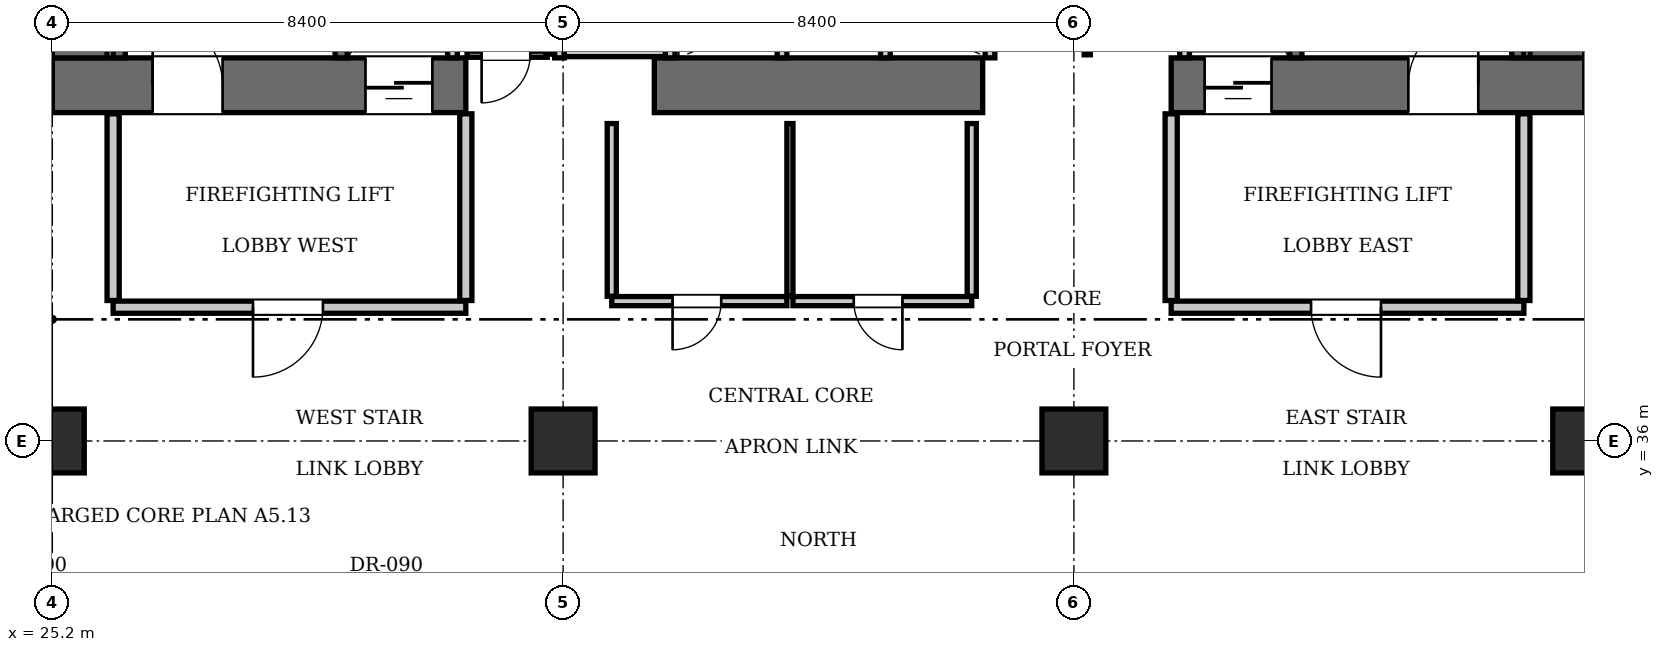
"""IFC4 building model, lengths in metres.
Left out: names, types, materials, properties, quantities, classifications, styles, units other than length and angle.
Written with IfcOpenShell. Run it as: python <this file> out.ifc"""

import sys

from ifc_helpers import new_model, si_unit, direction, frame, frame_2d, origin, origin_2d, place, context, subcontext, project, spatial, rectangle, extrude, element, fill, save


model = new_model("IFC4")
c1 = context("Model", 3, precision=1e-05, world=origin(), true_north=direction((0.0, 1.0)))
c2 = subcontext(c1, "Body", "Model", "MODEL_VIEW")
j1 = project(units=[si_unit("LENGTHUNIT", "METRE"), si_unit("PLANEANGLEUNIT", "RADIAN")], contexts=[c1])
p1 = place(None, origin())
s1 = spatial("IfcSite", under=j1, at=p1, CompositionType="ELEMENT")
p2 = place(p1, origin())
s2 = spatial("IfcBuilding", under=s1, at=p2, CompositionType="ELEMENT")
p3 = place(p2, frame((0.0, 0.0, 73.15)))
s3 = spatial("IfcBuildingStorey", under=s2, at=p3, CompositionType="ELEMENT", Elevation=73.15)
p4 = place(p3, frame((25.2, 41.85, 0.0), z_axis=(0.0, 0.0, 1.0), x_axis=(1.0, 0.0, 0.0)))
e1 = element("IfcWall", 1, at=p4, inside=s3, PredefinedType="SHEAR", context=c2, shape_type="SweptSolid", body=[
    extrude(rectangle(XDim=6.8, YDim=0.9, at=frame_2d((3.4, 0.0))), origin(), (0.0, 0.0, 1.0), 3.85),
])
p5 = place(p4, frame((1.65, 0.0, 0.0)))
e2 = element("IfcOpeningElement", 2, at=p5, cuts=e1, PredefinedType="OPENING", context=c2, shape_type="SweptSolid", body=[
    extrude(rectangle(XDim=1.15, YDim=2.15, at=frame_2d((0.575, 1.075))), frame((0.0, 0.46, 0.0), z_axis=(0.0, -1.0, 0.0), x_axis=(1.0, 0.0, 0.0)), (0.0, 0.0, 1.0), 0.92),
])
p6 = place(p4, frame((5.15, 0.0, 0.0)))
e3 = element("IfcOpeningElement", 3, at=p6, cuts=e1, PredefinedType="OPENING", context=c2, shape_type="SweptSolid", body=[
    extrude(rectangle(XDim=1.1, YDim=2.2, at=frame_2d((0.55, 1.1))), frame((0.0, 0.46, 0.0), z_axis=(0.0, -1.0, 0.0), x_axis=(1.0, 0.0, 0.0)), (0.0, 0.0, 1.0), 0.92),
])
p7 = place(p3, frame((35.1, 41.85, 0.0), z_axis=(0.0, 0.0, 1.0), x_axis=(1.0, 0.0, 0.0)))
e4 = element("IfcWall", 4, at=p7, inside=s3, PredefinedType="SHEAR", context=c2, shape_type="SweptSolid", body=[
    extrude(rectangle(XDim=5.4, YDim=0.9, at=frame_2d((2.7, 0.0))), origin(), (0.0, 0.0, 1.0), 3.85),
])
p8 = place(p3, frame((43.6, 41.85, 0.0), z_axis=(0.0, 0.0, 1.0), x_axis=(1.0, 0.0, 0.0)))
e5 = element("IfcWall", 5, at=p8, inside=s3, PredefinedType="SHEAR", context=c2, shape_type="SweptSolid", body=[
    extrude(rectangle(XDim=6.8, YDim=0.9, at=frame_2d((3.4, 0.0))), origin(), (0.0, 0.0, 1.0), 3.85),
])
p9 = place(p8, frame((3.9, 0.0, 0.0)))
e6 = element("IfcOpeningElement", 6, at=p9, cuts=e5, PredefinedType="OPENING", context=c2, shape_type="SweptSolid", body=[
    extrude(rectangle(XDim=1.15, YDim=2.15, at=frame_2d((0.575, 1.075))), frame((0.0, 0.46, 0.0), z_axis=(0.0, -1.0, 0.0), x_axis=(1.0, 0.0, 0.0)), (0.0, 0.0, 1.0), 0.92),
])
p10 = place(p8, frame((0.55, 0.0, 0.0)))
e7 = element("IfcOpeningElement", 7, at=p10, cuts=e5, PredefinedType="OPENING", context=c2, shape_type="SweptSolid", body=[
    extrude(rectangle(XDim=1.1, YDim=2.2, at=frame_2d((0.55, 1.1))), frame((0.0, 0.46, 0.0), z_axis=(0.0, -1.0, 0.0), x_axis=(1.0, 0.0, 0.0)), (0.0, 0.0, 1.0), 0.92),
])
for number, where, z_axis, x_axis in (
    (8, (25.65, 42.3, 0.0), (0.0, 0.0, 1.0), (0.0, 1.0, 0.0)),
    (9, (49.95, 42.3, 0.0), (0.0, 0.0, 1.0), (0.0, 1.0, 0.0)),
):
    element("IfcWall", number, at=place(p3, frame(where, z_axis=z_axis, x_axis=x_axis)), inside=s3, PredefinedType="SHEAR", context=c2, shape_type="SweptSolid", body=[
        extrude(rectangle(XDim=1.6, YDim=0.9, at=frame_2d((0.8, 0.0))), origin(), (0.0, 0.0, 1.0), 3.85),
    ])
for number, where, z_axis, x_axis in (
    (10, (25.2, 36.0, 0.0), (0.0, 0.0, 1.0), (1.0, 0.0, 0.0)),
    (11, (33.6, 36.0, 0.0), (0.0, 0.0, 1.0), (1.0, 0.0, 0.0)),
    (12, (42.0, 36.0, 0.0), (0.0, 0.0, 1.0), (1.0, 0.0, 0.0)),
    (13, (50.4, 36.0, 0.0), (0.0, 0.0, 1.0), (1.0, 0.0, 0.0)),
):
    element("IfcColumn", number, at=place(p3, frame(where, z_axis=z_axis, x_axis=x_axis)), inside=s3, PredefinedType="COLUMN", context=c2, shape_type="SweptSolid", body=[
        extrude(rectangle(XDim=1.05, YDim=1.05, at=origin_2d()), origin(), (0.0, 0.0, 1.0), 3.85),
    ])
p11 = place(p3, frame((29.95, 42.3, 0.0), z_axis=(0.0, 0.0, 1.0), x_axis=(0.0, 1.0, 0.0)))
e14 = element("IfcWall", 14, at=p11, inside=s3, PredefinedType="SOLIDWALL", context=c2, shape_type="SweptSolid", body=[
    extrude(rectangle(XDim=8.85, YDim=0.2, at=frame_2d((4.425, 0.0))), origin(), (0.0, 0.0, 1.0), 3.61),
])
p12 = place(p3, frame((26.3, 42.3, 0.0), z_axis=(0.0, 0.0, 1.0), x_axis=(0.0, 1.0, 0.0)))
e15 = element("IfcWall", 15, at=p12, inside=s3, PredefinedType="SOLIDWALL", context=c2, shape_type="SweptSolid", body=[
    extrude(rectangle(XDim=1.58, YDim=0.2, at=frame_2d((0.79, 0.0))), origin(), (0.0, 0.0, 1.0), 3.61),
])
p13 = place(p3, frame((45.65, 42.3, 0.0), z_axis=(0.0, 0.0, 1.0), x_axis=(0.0, 1.0, 0.0)))
e16 = element("IfcWall", 16, at=p13, inside=s3, PredefinedType="SOLIDWALL", context=c2, shape_type="SweptSolid", body=[
    extrude(rectangle(XDim=8.85, YDim=0.2, at=frame_2d((4.425, 0.0))), origin(), (0.0, 0.0, 1.0), 3.61),
])
p14 = place(p3, frame((49.3, 42.3, 0.0), z_axis=(0.0, 0.0, 1.0), x_axis=(0.0, 1.0, 0.0)))
e17 = element("IfcWall", 17, at=p14, inside=s3, PredefinedType="SOLIDWALL", context=c2, shape_type="SweptSolid", body=[
    extrude(rectangle(XDim=1.58, YDim=0.2, at=frame_2d((0.79, 0.0))), origin(), (0.0, 0.0, 1.0), 3.61),
])
for number, where, z_axis, x_axis in (
    (18, (31.78, 42.3, 0.0), (0.0, 0.0, 1.0), (0.0, 1.0, 0.0)),
    (19, (43.82, 42.3, 0.0), (0.0, 0.0, 1.0), (0.0, 1.0, 0.0)),
):
    element("IfcWall", number, at=place(p3, frame(where, z_axis=z_axis, x_axis=x_axis)), inside=s3, PredefinedType="SOLIDWALL", context=c2, shape_type="SweptSolid", body=[
        extrude(rectangle(XDim=2.44, YDim=0.16, at=frame_2d((1.22, 0.0))), origin(), (0.0, 0.0, 1.0), 3.61),
    ])
for number, where, z_axis, x_axis in (
    (20, (37.2, 42.3, 0.0), (0.0, 0.0, 1.0), (0.0, 1.0, 0.0)),
    (21, (38.9, 42.3, 0.0), (0.0, 0.0, 1.0), (0.0, 1.0, 0.0)),
    (22, (40.62, 42.3, 0.0), (0.0, 0.0, 1.0), (0.0, 1.0, 0.0)),
):
    element("IfcWall", number, at=place(p3, frame(where, z_axis=z_axis, x_axis=x_axis)), inside=s3, PredefinedType="SOLIDWALL", context=c2, shape_type="SweptSolid", body=[
        extrude(rectangle(XDim=2.05, YDim=0.16, at=frame_2d((1.025, 0.0))), origin(), (0.0, 0.0, 1.0), 3.61),
    ])
for number, where, z_axis, x_axis in (
    (23, (33.54, 42.3, 0.0), (0.0, 0.0, 1.0), (0.0, 1.0, 0.0)),
    (24, (35.36, 42.3, 0.0), (0.0, 0.0, 1.0), (0.0, 1.0, 0.0)),
):
    element("IfcWall", number, at=place(p3, frame(where, z_axis=z_axis, x_axis=x_axis)), inside=s3, PredefinedType="SOLIDWALL", context=c2, shape_type="SweptSolid", body=[
        extrude(rectangle(XDim=2.1, YDim=0.16, at=frame_2d((1.05, 0.0))), origin(), (0.0, 0.0, 1.0), 3.61),
    ])
p15 = place(p3, frame((33.62, 42.4, 0.0), z_axis=(0.0, 0.0, 1.0), x_axis=(1.0, 0.0, 0.0)))
e25 = element("IfcWall", 25, at=p15, inside=s3, PredefinedType="SOLIDWALL", context=c2, shape_type="SweptSolid", body=[
    extrude(rectangle(XDim=1.66, YDim=0.16, at=frame_2d((0.83, 0.0))), origin(), (0.0, 0.0, 1.0), 3.61),
])
p16 = place(p3, frame((26.2, 38.2, 0.0), z_axis=(0.0, 0.0, 1.0), x_axis=(1.0, 0.0, 0.0)))
e26 = element("IfcWall", 26, at=p16, inside=s3, PredefinedType="PARTITIONING", context=c2, shape_type="SweptSolid", body=[
    extrude(rectangle(XDim=5.8, YDim=0.2, at=frame_2d((2.9, 0.0))), origin(), (0.0, 0.0, 1.0), 3.61),
])
p17 = place(p16, frame((2.3, 0.0, 0.0)))
e27 = element("IfcOpeningElement", 27, at=p17, cuts=e26, PredefinedType="OPENING", context=c2, shape_type="SweptSolid", body=[
    extrude(rectangle(XDim=1.15, YDim=2.15, at=frame_2d((0.575, 1.075))), frame((0.0, 0.11, 0.0), z_axis=(0.0, -1.0, 0.0), x_axis=(1.0, 0.0, 0.0)), (0.0, 0.0, 1.0), 0.22),
])
for number, where, z_axis, x_axis in (
    (28, (26.2, 38.31, 0.0), (0.0, 0.0, 1.0), (0.0, 1.0, 0.0)),
    (29, (32.0, 38.31, 0.0), (0.0, 0.0, 1.0), (0.0, 1.0, 0.0)),
):
    element("IfcWall", number, at=place(p3, frame(where, z_axis=z_axis, x_axis=x_axis)), inside=s3, PredefinedType="PARTITIONING", context=c2, shape_type="SweptSolid", body=[
        extrude(rectangle(XDim=3.07, YDim=0.2, at=frame_2d((1.535, 0.0))), origin(), (0.0, 0.0, 1.0), 3.61),
    ])
p18 = place(p3, frame((43.6, 38.2, 0.0), z_axis=(0.0, 0.0, 1.0), x_axis=(1.0, 0.0, 0.0)))
e30 = element("IfcWall", 30, at=p18, inside=s3, PredefinedType="PARTITIONING", context=c2, shape_type="SweptSolid", body=[
    extrude(rectangle(XDim=5.8, YDim=0.2, at=frame_2d((2.9, 0.0))), origin(), (0.0, 0.0, 1.0), 3.61),
])
p19 = place(p18, frame((2.3, 0.0, 0.0)))
e31 = element("IfcOpeningElement", 31, at=p19, cuts=e30, PredefinedType="OPENING", context=c2, shape_type="SweptSolid", body=[
    extrude(rectangle(XDim=1.15, YDim=2.15, at=frame_2d((0.575, 1.075))), frame((0.0, 0.11, 0.0), z_axis=(0.0, -1.0, 0.0), x_axis=(1.0, 0.0, 0.0)), (0.0, 0.0, 1.0), 0.22),
])
for number, where, z_axis, x_axis in (
    (32, (43.6, 38.31, 0.0), (0.0, 0.0, 1.0), (0.0, 1.0, 0.0)),
    (33, (49.4, 38.31, 0.0), (0.0, 0.0, 1.0), (0.0, 1.0, 0.0)),
):
    element("IfcWall", number, at=place(p3, frame(where, z_axis=z_axis, x_axis=x_axis)), inside=s3, PredefinedType="PARTITIONING", context=c2, shape_type="SweptSolid", body=[
        extrude(rectangle(XDim=3.07, YDim=0.2, at=frame_2d((1.535, 0.0))), origin(), (0.0, 0.0, 1.0), 3.61),
    ])
p20 = place(p3, frame((32.02, 42.36, 0.0), z_axis=(0.0, 0.0, 1.0), x_axis=(1.0, 0.0, 0.0)))
e34 = element("IfcWall", 34, at=p20, inside=s3, PredefinedType="PARTITIONING", context=c2, shape_type="SweptSolid", body=[
    extrude(rectangle(XDim=1.32, YDim=0.1, at=frame_2d((0.66, 0.0))), origin(), (0.0, 0.0, 1.0), 3.61),
])
p21 = place(p20, frame((0.24, 0.0, 0.0)))
e35 = element("IfcOpeningElement", 35, at=p21, cuts=e34, PredefinedType="OPENING", context=c2, shape_type="SweptSolid", body=[
    extrude(rectangle(XDim=0.8, YDim=2.05, at=frame_2d((0.4, 1.025))), frame((0.0, 0.06, 0.0), z_axis=(0.0, -1.0, 0.0), x_axis=(1.0, 0.0, 0.0)), (0.0, 0.0, 1.0), 0.12),
])
p22 = place(p3, frame((33.36, 42.36, 0.0), z_axis=(0.0, 0.0, 1.0), x_axis=(0.0, 1.0, 0.0)))
e36 = element("IfcWall", 36, at=p22, inside=s3, PredefinedType="PARTITIONING", context=c2, shape_type="SweptSolid", body=[
    extrude(rectangle(XDim=2.58, YDim=0.1, at=frame_2d((1.29, 0.0))), origin(), (0.0, 0.0, 1.0), 3.61),
])
p23 = place(p3, frame((42.22, 42.35, 0.0), z_axis=(0.0, 0.0, 1.0), x_axis=(0.0, 1.0, 0.0)))
e37 = element("IfcWall", 37, at=p23, inside=s3, PredefinedType="PARTITIONING", context=c2, shape_type="SweptSolid", body=[
    extrude(rectangle(XDim=2.61, YDim=0.1, at=frame_2d((1.305, 0.0))), origin(), (0.0, 0.0, 1.0), 3.61),
])
p24 = place(p23, frame((0.65, 0.0, 0.0)))
e38 = element("IfcOpeningElement", 38, at=p24, cuts=e37, PredefinedType="OPENING", context=c2, shape_type="SweptSolid", body=[
    extrude(rectangle(XDim=0.8, YDim=2.05, at=frame_2d((0.4, 1.025))), frame((0.0, 0.06, 0.0), z_axis=(0.0, -1.0, 0.0), x_axis=(1.0, 0.0, 0.0)), (0.0, 0.0, 1.0), 0.12),
])
p25 = place(p3, frame((34.4, 38.3, 0.0), z_axis=(0.0, 0.0, 1.0), x_axis=(1.0, 0.0, 0.0)))
e39 = element("IfcWall", 39, at=p25, inside=s3, PredefinedType="PARTITIONING", context=c2, shape_type="SweptSolid", body=[
    extrude(rectangle(XDim=2.88, YDim=0.15, at=frame_2d((1.44, 0.0))), origin(), (0.0, 0.0, 1.0), 3.61),
])
p26 = place(p25, frame((1.0, 0.0, 0.0)))
e40 = element("IfcOpeningElement", 40, at=p26, cuts=e39, PredefinedType="OPENING", context=c2, shape_type="SweptSolid", body=[
    extrude(rectangle(XDim=0.8, YDim=2.05, at=frame_2d((0.4, 1.025))), frame((0.0, 0.085, 0.0), z_axis=(0.0, -1.0, 0.0), x_axis=(1.0, 0.0, 0.0)), (0.0, 0.0, 1.0), 0.17),
])
p27 = place(p3, frame((37.38, 38.3, 0.0), z_axis=(0.0, 0.0, 1.0), x_axis=(1.0, 0.0, 0.0)))
e41 = element("IfcWall", 41, at=p27, inside=s3, PredefinedType="PARTITIONING", context=c2, shape_type="SweptSolid", body=[
    extrude(rectangle(XDim=2.94, YDim=0.15, at=frame_2d((1.47, 0.0))), origin(), (0.0, 0.0, 1.0), 3.61),
])
p28 = place(p27, frame((1.0, 0.0, 0.0)))
e42 = element("IfcOpeningElement", 42, at=p28, cuts=e41, PredefinedType="OPENING", context=c2, shape_type="SweptSolid", body=[
    extrude(rectangle(XDim=0.8, YDim=2.05, at=frame_2d((0.4, 1.025))), frame((0.0, 0.085, 0.0), z_axis=(0.0, -1.0, 0.0), x_axis=(1.0, 0.0, 0.0)), (0.0, 0.0, 1.0), 0.17),
])
p29 = place(p3, frame((34.4, 38.38, 0.0), z_axis=(0.0, 0.0, 1.0), x_axis=(0.0, 1.0, 0.0)))
e43 = element("IfcWall", 43, at=p29, inside=s3, PredefinedType="PARTITIONING", context=c2, shape_type="SweptSolid", body=[
    extrude(rectangle(XDim=2.84, YDim=0.15, at=frame_2d((1.42, 0.0))), origin(), (0.0, 0.0, 1.0), 3.61),
])
p30 = place(p3, frame((37.33, 38.38, 0.0), z_axis=(0.0, 0.0, 1.0), x_axis=(0.0, 1.0, 0.0)))
e44 = element("IfcWall", 44, at=p30, inside=s3, PredefinedType="PARTITIONING", context=c2, shape_type="SweptSolid", body=[
    extrude(rectangle(XDim=2.84, YDim=0.1, at=frame_2d((1.42, 0.0))), origin(), (0.0, 0.0, 1.0), 3.61),
])
p31 = place(p3, frame((40.32, 38.38, 0.0), z_axis=(0.0, 0.0, 1.0), x_axis=(0.0, 1.0, 0.0)))
e45 = element("IfcWall", 45, at=p31, inside=s3, PredefinedType="PARTITIONING", context=c2, shape_type="SweptSolid", body=[
    extrude(rectangle(XDim=2.84, YDim=0.15, at=frame_2d((1.42, 0.0))), origin(), (0.0, 0.0, 1.0), 3.61),
])
p32 = place(p5, origin())
e46 = element("IfcDoor", 46, at=p32, inside=s3, OperationType="SINGLE_SWING_LEFT", PredefinedType="DOOR", context=c2, shape_type="SweptSolid", body=[
    extrude(rectangle(XDim=1.15, YDim=2.15, at=frame_2d((0.575, 1.075))), frame((0.0, 0.025, 0.0), z_axis=(0.0, -1.0, 0.0), x_axis=(1.0, 0.0, 0.0)), (0.0, 0.0, 1.0), 0.05),
])
fill(e2, e46)
p33 = place(p9, origin())
e47 = element("IfcDoor", 47, at=p33, inside=s3, OperationType="SINGLE_SWING_RIGHT", PredefinedType="DOOR", context=c2, shape_type="SweptSolid", body=[
    extrude(rectangle(XDim=1.15, YDim=2.15, at=frame_2d((0.575, 1.075))), frame((0.0, 0.025, 0.0), z_axis=(0.0, -1.0, 0.0), x_axis=(1.0, 0.0, 0.0)), (0.0, 0.0, 1.0), 0.05),
])
fill(e6, e47)
p34 = place(p6, frame((1.1, 0.0, 0.0), z_axis=(0.0, 0.0, 1.0), x_axis=(-1.0, 0.0, 0.0)))
e48 = element("IfcDoor", 48, at=p34, inside=s3, OperationType="SLIDING_TO_LEFT", PredefinedType="DOOR", context=c2, shape_type="SweptSolid", body=[
    extrude(rectangle(XDim=1.1, YDim=2.2, at=frame_2d((0.55, 1.1))), frame((0.0, 0.025, 0.0), z_axis=(0.0, -1.0, 0.0), x_axis=(1.0, 0.0, 0.0)), (0.0, 0.0, 1.0), 0.05),
])
fill(e3, e48)
p35 = place(p10, frame((1.1, 0.0, 0.0), z_axis=(0.0, 0.0, 1.0), x_axis=(-1.0, 0.0, 0.0)))
e49 = element("IfcDoor", 49, at=p35, inside=s3, OperationType="SLIDING_TO_LEFT", PredefinedType="DOOR", context=c2, shape_type="SweptSolid", body=[
    extrude(rectangle(XDim=1.1, YDim=2.2, at=frame_2d((0.55, 1.1))), frame((0.0, 0.025, 0.0), z_axis=(0.0, -1.0, 0.0), x_axis=(1.0, 0.0, 0.0)), (0.0, 0.0, 1.0), 0.05),
])
fill(e7, e49)
p36 = place(p17, frame((1.15, 0.0, 0.0), z_axis=(0.0, 0.0, 1.0), x_axis=(-1.0, 0.0, 0.0)))
e50 = element("IfcDoor", 50, at=p36, inside=s3, OperationType="SINGLE_SWING_RIGHT", PredefinedType="DOOR", context=c2, shape_type="SweptSolid", body=[
    extrude(rectangle(XDim=1.15, YDim=2.15, at=frame_2d((0.575, 1.075))), frame((0.0, 0.025, 0.0), z_axis=(0.0, -1.0, 0.0), x_axis=(1.0, 0.0, 0.0)), (0.0, 0.0, 1.0), 0.05),
])
fill(e27, e50)
p37 = place(p19, frame((1.15, 0.0, 0.0), z_axis=(0.0, 0.0, 1.0), x_axis=(-1.0, 0.0, 0.0)))
e51 = element("IfcDoor", 51, at=p37, inside=s3, OperationType="SINGLE_SWING_LEFT", PredefinedType="DOOR", context=c2, shape_type="SweptSolid", body=[
    extrude(rectangle(XDim=1.15, YDim=2.15, at=frame_2d((0.575, 1.075))), frame((0.0, 0.025, 0.0), z_axis=(0.0, -1.0, 0.0), x_axis=(1.0, 0.0, 0.0)), (0.0, 0.0, 1.0), 0.05),
])
fill(e31, e51)
p38 = place(p21, frame((0.8, 0.0, 0.0), z_axis=(0.0, 0.0, 1.0), x_axis=(-1.0, 0.0, 0.0)))
e52 = element("IfcDoor", 52, at=p38, inside=s3, OperationType="SINGLE_SWING_RIGHT", PredefinedType="DOOR", context=c2, shape_type="SweptSolid", body=[
    extrude(rectangle(XDim=0.8, YDim=2.05, at=frame_2d((0.4, 1.025))), frame((0.0, 0.025, 0.0), z_axis=(0.0, -1.0, 0.0), x_axis=(1.0, 0.0, 0.0)), (0.0, 0.0, 1.0), 0.05),
])
fill(e35, e52)
p39 = place(p26, frame((0.8, 0.0, 0.0), z_axis=(0.0, 0.0, 1.0), x_axis=(-1.0, 0.0, 0.0)))
e53 = element("IfcDoor", 53, at=p39, inside=s3, OperationType="SINGLE_SWING_RIGHT", PredefinedType="DOOR", context=c2, shape_type="SweptSolid", body=[
    extrude(rectangle(XDim=0.8, YDim=2.05, at=frame_2d((0.4, 1.025))), frame((0.0, 0.025, 0.0), z_axis=(0.0, -1.0, 0.0), x_axis=(1.0, 0.0, 0.0)), (0.0, 0.0, 1.0), 0.05),
])
fill(e40, e53)
p40 = place(p28, frame((0.8, 0.0, 0.0), z_axis=(0.0, 0.0, 1.0), x_axis=(-1.0, 0.0, 0.0)))
e54 = element("IfcDoor", 54, at=p40, inside=s3, OperationType="SINGLE_SWING_LEFT", PredefinedType="DOOR", context=c2, shape_type="SweptSolid", body=[
    extrude(rectangle(XDim=0.8, YDim=2.05, at=frame_2d((0.4, 1.025))), frame((0.0, 0.025, 0.0), z_axis=(0.0, -1.0, 0.0), x_axis=(1.0, 0.0, 0.0)), (0.0, 0.0, 1.0), 0.05),
])
fill(e42, e54)
save(model, sys.argv[1])
